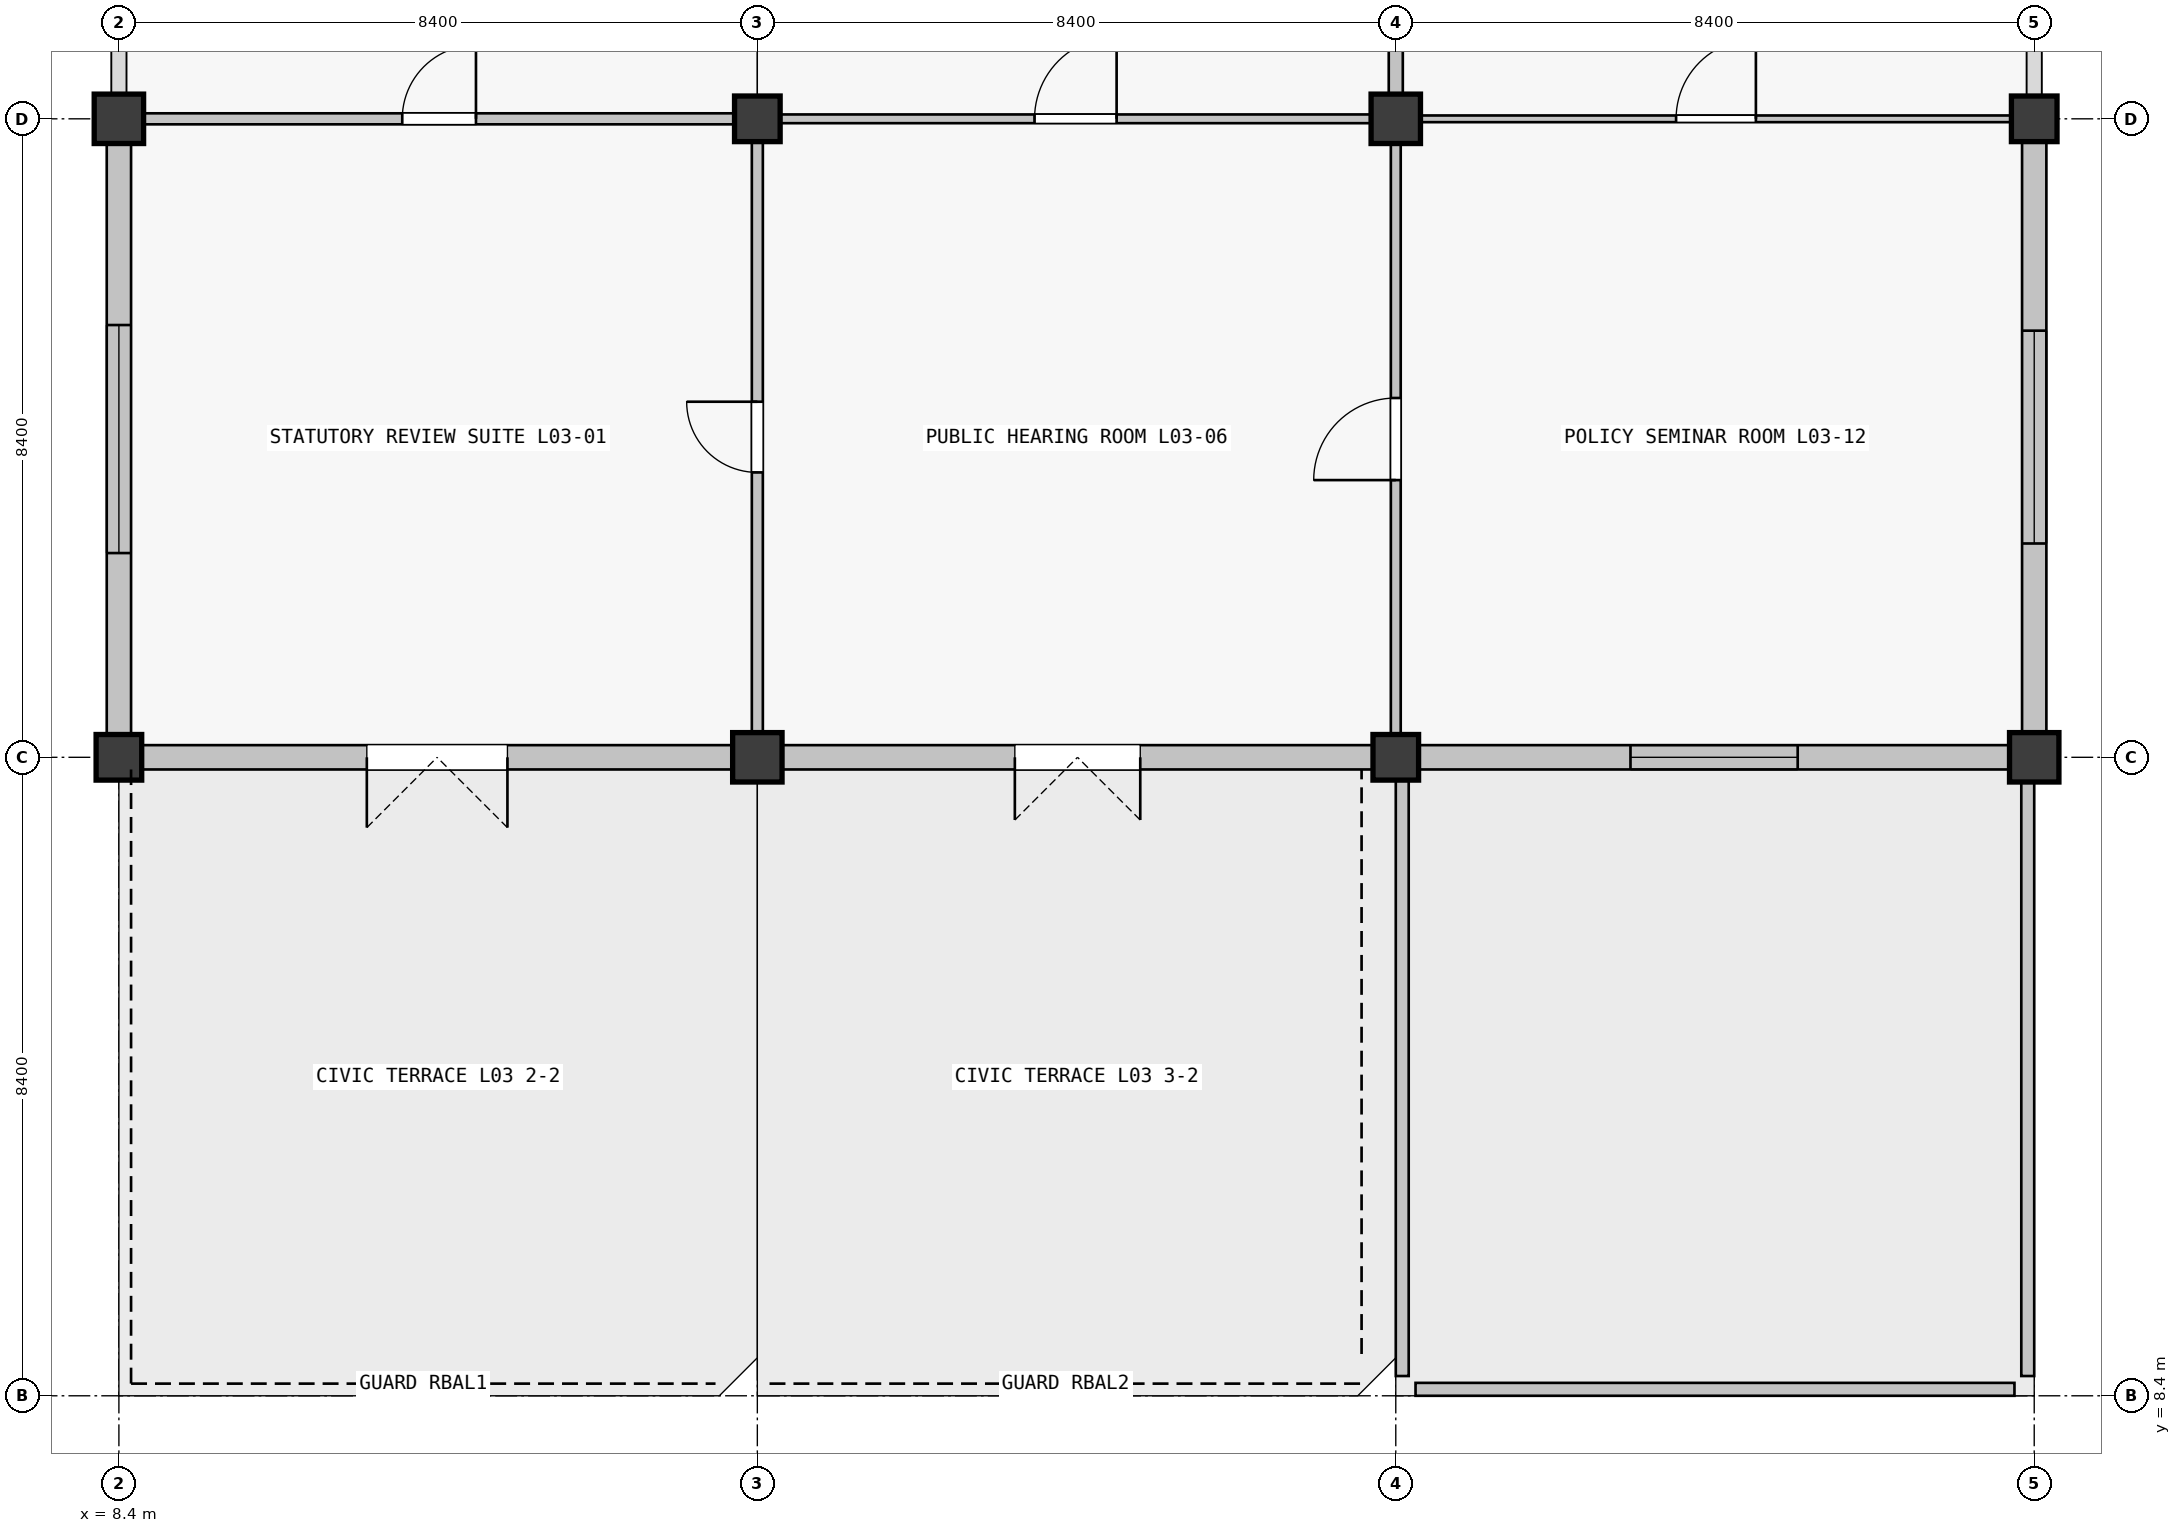
"""IFC4 building model, lengths in metres.
Left out: names, types, materials, properties, quantities, classifications, styles, units other than length and angle.
Written with IfcOpenShell. Run it as: python <this file> out.ifc"""

import sys

from ifc_helpers import new_model, si_unit, direction, frame, frame_2d, origin, origin_2d, place, context, subcontext, project, spatial, rectangle, extrude, element, fill, save


model = new_model("IFC4")
c1 = context("Model", 3, precision=1e-05, world=origin(), true_north=direction((0.0, 1.0)))
c2 = subcontext(c1, "Body", "Model", "MODEL_VIEW")
j1 = project(units=[si_unit("LENGTHUNIT", "METRE"), si_unit("PLANEANGLEUNIT", "RADIAN")], contexts=[c1])
p1 = place(None, origin())
s1 = spatial("IfcSite", under=j1, at=p1, CompositionType="ELEMENT")
p2 = place(p1, origin())
s2 = spatial("IfcBuilding", under=s1, at=p2, CompositionType="ELEMENT")
p3 = place(p2, frame((0.0, 0.0, 14.76)))
s3 = spatial("IfcBuildingStorey", under=s2, at=p3, CompositionType="ELEMENT", Elevation=14.76)
p4 = place(p3, frame((8.4, 16.8, 0.0), z_axis=(0.0, 0.0, 1.0), x_axis=(1.0, 0.0, 0.0)))
e1 = element("IfcColumn", 1, at=p4, inside=s3, PredefinedType="COLUMN", context=c2, shape_type="SweptSolid", body=[
    extrude(rectangle(XDim=0.6, YDim=0.6, at=origin_2d()), origin(), (0.0, 0.0, 1.0), 4.32),
])
for number, where, z_axis, x_axis in (
    (2, (8.4, 25.2, 0.0), (0.0, 0.0, 1.0), (1.0, 0.0, 0.0)),
    (3, (16.8, 16.8, 0.0), (0.0, 0.0, 1.0), (1.0, 0.0, 0.0)),
):
    element("IfcColumn", number, at=place(p3, frame(where, z_axis=z_axis, x_axis=x_axis)), inside=s3, PredefinedType="COLUMN", context=c2, shape_type="SweptSolid", body=[
        extrude(rectangle(XDim=0.65, YDim=0.65, at=origin_2d()), origin(), (0.0, 0.0, 1.0), 4.32),
    ])
for number, where, z_axis, x_axis in (
    (4, (16.8, 25.2, 0.0), (0.0, 0.0, 1.0), (1.0, 0.0, 0.0)),
    (5, (25.2, 16.8, 0.0), (0.0, 0.0, 1.0), (1.0, 0.0, 0.0)),
):
    element("IfcColumn", number, at=place(p3, frame(where, z_axis=z_axis, x_axis=x_axis)), inside=s3, PredefinedType="COLUMN", context=c2, shape_type="SweptSolid", body=[
        extrude(rectangle(XDim=0.6, YDim=0.6, at=origin_2d()), origin(), (0.0, 0.0, 1.0), 4.32),
    ])
for number, where, z_axis, x_axis in (
    (6, (25.2, 25.2, 0.0), (0.0, 0.0, 1.0), (1.0, 0.0, 0.0)),
    (7, (33.6, 16.8, 0.0), (0.0, 0.0, 1.0), (1.0, 0.0, 0.0)),
):
    element("IfcColumn", number, at=place(p3, frame(where, z_axis=z_axis, x_axis=x_axis)), inside=s3, PredefinedType="COLUMN", context=c2, shape_type="SweptSolid", body=[
        extrude(rectangle(XDim=0.65, YDim=0.65, at=origin_2d()), origin(), (0.0, 0.0, 1.0), 4.32),
    ])
p5 = place(p3, frame((33.6, 25.2, 0.0), z_axis=(0.0, 0.0, 1.0), x_axis=(1.0, 0.0, 0.0)))
e8 = element("IfcColumn", 8, at=p5, inside=s3, PredefinedType="COLUMN", context=c2, shape_type="SweptSolid", body=[
    extrude(rectangle(XDim=0.6, YDim=0.6, at=origin_2d()), origin(), (0.0, 0.0, 1.0), 4.32),
])
p6 = place(p3, frame((16.474, 16.8, 0.0), z_axis=(0.0, 0.0, 1.0), x_axis=(-1.0, 0.0, 0.0)))
e9 = element("IfcWall", 9, at=p6, inside=s3, PredefinedType="SOLIDWALL", context=c2, shape_type="SweptSolid", body=[
    extrude(rectangle(XDim=7.773, YDim=0.32, at=frame_2d((3.887, 0.0))), origin(), (0.0, 0.0, 1.0), 3.37),
])
p7 = place(p6, frame((2.962, 0.0, 0.0)))
e10 = element("IfcOpeningElement", 10, at=p7, cuts=e9, PredefinedType="OPENING", context=c2, shape_type="SweptSolid", body=[
    extrude(rectangle(XDim=1.85, YDim=2.2, at=frame_2d((0.925, 1.1))), frame((0.0, 0.16, 0.0), z_axis=(0.0, -1.0, 0.0), x_axis=(1.0, 0.0, 0.0)), (0.0, 0.0, 1.0), 0.32),
])
p8 = place(p3, frame((8.4, 17.101, 0.0), z_axis=(0.0, 0.0, 1.0), x_axis=(0.0, 1.0, 0.0)))
e11 = element("IfcWall", 11, at=p8, inside=s3, PredefinedType="SOLIDWALL", context=c2, shape_type="SweptSolid", body=[
    extrude(rectangle(XDim=7.773, YDim=0.32, at=frame_2d((3.886, 0.0))), origin(), (0.0, 0.0, 1.0), 3.37),
])
p9 = place(p8, frame((2.386, 0.0, 0.9)))
e12 = element("IfcOpeningElement", 12, at=p9, cuts=e11, PredefinedType="OPENING", context=c2, shape_type="SweptSolid", body=[
    extrude(rectangle(XDim=3.0, YDim=1.2, at=frame_2d((1.5, 0.6))), frame((0.0, 0.16, 0.0), z_axis=(0.0, -1.0, 0.0), x_axis=(1.0, 0.0, 0.0)), (0.0, 0.0, 1.0), 0.32),
])
p10 = place(p3, frame((24.899, 16.8, 0.0), z_axis=(0.0, 0.0, 1.0), x_axis=(-1.0, 0.0, 0.0)))
e13 = element("IfcWall", 13, at=p10, inside=s3, PredefinedType="SOLIDWALL", context=c2, shape_type="SweptSolid", body=[
    extrude(rectangle(XDim=7.773, YDim=0.32, at=frame_2d((3.886, 0.0))), origin(), (0.0, 0.0, 1.0), 3.37),
])
p11 = place(p10, frame((3.061, 0.0, 0.0)))
e14 = element("IfcOpeningElement", 14, at=p11, cuts=e13, PredefinedType="OPENING", context=c2, shape_type="SweptSolid", body=[
    extrude(rectangle(XDim=1.65, YDim=2.2, at=frame_2d((0.825, 1.1))), frame((0.0, 0.16, 0.0), z_axis=(0.0, -1.0, 0.0), x_axis=(1.0, 0.0, 0.0)), (0.0, 0.0, 1.0), 0.32),
])
p12 = place(p3, frame((33.274, 16.8, 0.0), z_axis=(0.0, 0.0, 1.0), x_axis=(-1.0, 0.0, 0.0)))
e15 = element("IfcWall", 15, at=p12, inside=s3, PredefinedType="SOLIDWALL", context=c2, shape_type="SweptSolid", body=[
    extrude(rectangle(XDim=7.773, YDim=0.32, at=frame_2d((3.886, 0.0))), origin(), (0.0, 0.0, 1.0), 3.37),
])
p13 = place(p12, frame((2.786, 0.0, 0.9)))
e16 = element("IfcOpeningElement", 16, at=p13, cuts=e15, PredefinedType="OPENING", context=c2, shape_type="SweptSolid", body=[
    extrude(rectangle(XDim=2.2, YDim=1.75, at=frame_2d((1.1, 0.875))), frame((0.0, 0.16, 0.0), z_axis=(0.0, -1.0, 0.0), x_axis=(1.0, 0.0, 0.0)), (0.0, 0.0, 1.0), 0.32),
])
p14 = place(p3, frame((33.6, 24.899, 0.0), z_axis=(0.0, 0.0, 1.0), x_axis=(0.0, -1.0, 0.0)))
e17 = element("IfcWall", 17, at=p14, inside=s3, PredefinedType="SOLIDWALL", context=c2, shape_type="SweptSolid", body=[
    extrude(rectangle(XDim=7.773, YDim=0.32, at=frame_2d((3.886, 0.0))), origin(), (0.0, 0.0, 1.0), 3.37),
])
p15 = place(p14, frame((2.486, 0.0, 0.9)))
e18 = element("IfcOpeningElement", 18, at=p15, cuts=e17, PredefinedType="OPENING", context=c2, shape_type="SweptSolid", body=[
    extrude(rectangle(XDim=2.8, YDim=1.75, at=frame_2d((1.4, 0.875))), frame((0.0, 0.16, 0.0), z_axis=(0.0, -1.0, 0.0), x_axis=(1.0, 0.0, 0.0)), (0.0, 0.0, 1.0), 0.32),
])
for number, where, z_axis, x_axis in (
    (19, (33.34, 8.485, 0.0), (0.0, 0.0, 1.0), (-1.0, 0.0, 0.0)),
    (20, (25.285, 8.66, 0.0), (0.0, 0.0, 1.0), (0.0, 1.0, 0.0)),
    (21, (33.515, 16.54, 0.0), (0.0, 0.0, 1.0), (0.0, -1.0, 0.0)),
):
    element("IfcWall", number, at=place(p3, frame(where, z_axis=z_axis, x_axis=x_axis)), inside=s3, PredefinedType="PARAPET", context=c2, shape_type="SweptSolid", body=[
        extrude(rectangle(XDim=7.88, YDim=0.17, at=frame_2d((3.94, 0.0))), origin(), (0.0, 0.0, 1.0), 0.95),
    ])
p16 = place(p3, frame((8.727, 25.2, 0.0), z_axis=(0.0, 0.0, 1.0), x_axis=(1.0, 0.0, 0.0)))
e22 = element("IfcWall", 22, at=p16, inside=s3, PredefinedType="PARTITIONING", context=c2, shape_type="SweptSolid", body=[
    extrude(rectangle(XDim=7.771, YDim=0.145, at=frame_2d((3.885, 0.0))), origin(), (0.0, 0.0, 1.0), 3.19),
])
p17 = place(p16, frame((3.401, 0.0, 0.0)))
e23 = element("IfcOpeningElement", 23, at=p17, cuts=e22, PredefinedType="OPENING", context=c2, shape_type="SweptSolid", body=[
    extrude(rectangle(XDim=0.97, YDim=2.12, at=frame_2d((0.485, 1.06))), frame((0.0, 0.073, 0.0), z_axis=(0.0, -1.0, 0.0), x_axis=(1.0, 0.0, 0.0)), (0.0, 0.0, 1.0), 0.145),
])
p18 = place(p3, frame((17.102, 25.2, 0.0), z_axis=(0.0, 0.0, 1.0), x_axis=(1.0, 0.0, 0.0)))
e24 = element("IfcWall", 24, at=p18, inside=s3, PredefinedType="PARTITIONING", context=c2, shape_type="SweptSolid", body=[
    extrude(rectangle(XDim=7.771, YDim=0.115, at=frame_2d((3.885, 0.0))), origin(), (0.0, 0.0, 1.0), 3.19),
])
p19 = place(p18, frame((3.345, 0.0, 0.0)))
e25 = element("IfcOpeningElement", 25, at=p19, cuts=e24, PredefinedType="OPENING", context=c2, shape_type="SweptSolid", body=[
    extrude(rectangle(XDim=1.08, YDim=2.25, at=frame_2d((0.54, 1.125))), frame((0.0, 0.058, 0.0), z_axis=(0.0, -1.0, 0.0), x_axis=(1.0, 0.0, 0.0)), (0.0, 0.0, 1.0), 0.115),
])
p20 = place(p3, frame((25.527, 25.2, 0.0), z_axis=(0.0, 0.0, 1.0), x_axis=(1.0, 0.0, 0.0)))
e26 = element("IfcWall", 26, at=p20, inside=s3, PredefinedType="PARTITIONING", context=c2, shape_type="SweptSolid", body=[
    extrude(rectangle(XDim=7.771, YDim=0.088, at=frame_2d((3.885, 0.0))), origin(), (0.0, 0.0, 1.0), 3.19),
])
p21 = place(p20, frame((3.361, 0.0, 0.0)))
e27 = element("IfcOpeningElement", 27, at=p21, cuts=e26, PredefinedType="OPENING", context=c2, shape_type="SweptSolid", body=[
    extrude(rectangle(XDim=1.05, YDim=2.12, at=frame_2d((0.525, 1.06))), frame((0.0, 0.044, 0.0), z_axis=(0.0, -1.0, 0.0), x_axis=(1.0, 0.0, 0.0)), (0.0, 0.0, 1.0), 0.088),
])
p22 = place(p3, frame((16.8, 17.127, 0.0), z_axis=(0.0, 0.0, 1.0), x_axis=(0.0, 1.0, 0.0)))
e28 = element("IfcWall", 28, at=p22, inside=s3, PredefinedType="PARTITIONING", context=c2, shape_type="SweptSolid", body=[
    extrude(rectangle(XDim=7.771, YDim=0.145, at=frame_2d((3.885, 0.0))), origin(), (0.0, 0.0, 1.0), 3.19),
])
p23 = place(p22, frame((3.421, 0.0, 0.0)))
e29 = element("IfcOpeningElement", 29, at=p23, cuts=e28, PredefinedType="OPENING", context=c2, shape_type="SweptSolid", body=[
    extrude(rectangle(XDim=0.93, YDim=2.12, at=frame_2d((0.465, 1.06))), frame((0.0, 0.073, 0.0), z_axis=(0.0, -1.0, 0.0), x_axis=(1.0, 0.0, 0.0)), (0.0, 0.0, 1.0), 0.145),
])
p24 = place(p3, frame((25.2, 17.102, 0.0), z_axis=(0.0, 0.0, 1.0), x_axis=(0.0, 1.0, 0.0)))
e30 = element("IfcWall", 30, at=p24, inside=s3, PredefinedType="MOVABLE", context=c2, shape_type="SweptSolid", body=[
    extrude(rectangle(XDim=7.771, YDim=0.13, at=frame_2d((3.885, 0.0))), origin(), (0.0, 0.0, 1.0), 3.19),
])
p25 = place(p24, frame((3.345, 0.0, 0.0)))
e31 = element("IfcOpeningElement", 31, at=p25, cuts=e30, PredefinedType="OPENING", context=c2, shape_type="SweptSolid", body=[
    extrude(rectangle(XDim=1.08, YDim=2.25, at=frame_2d((0.54, 1.125))), frame((0.0, 0.065, 0.0), z_axis=(0.0, -1.0, 0.0), x_axis=(1.0, 0.0, 0.0)), (0.0, 0.0, 1.0), 0.13),
])
p26 = place(p3, frame((25.2, 25.527, 0.0), z_axis=(0.0, 0.0, 1.0), x_axis=(0.0, 1.0, 0.0)))
e32 = element("IfcWall", 32, at=p26, inside=s3, PredefinedType="PARTITIONING", context=c2, shape_type="SweptSolid", body=[
    extrude(rectangle(XDim=7.771, YDim=0.185, at=frame_2d((3.885, 0.0))), origin(), (0.0, 0.0, 1.0), 3.19),
])
p27 = place(p26, frame((3.365, 0.0, 0.0)))
e33 = element("IfcOpeningElement", 33, at=p27, cuts=e32, PredefinedType="OPENING", context=c2, shape_type="SweptSolid", body=[
    extrude(rectangle(XDim=1.04, YDim=2.2, at=frame_2d((0.52, 1.1))), frame((0.0, 0.093, 0.0), z_axis=(0.0, -1.0, 0.0), x_axis=(1.0, 0.0, 0.0)), (0.0, 0.0, 1.0), 0.185),
])
p28 = place(p7, origin())
e34 = element("IfcDoor", 34, at=p28, inside=s3, OperationType="DOUBLE_DOOR_SINGLE_SWING", PredefinedType="DOOR", context=c2, shape_type="SweptSolid", body=[
    extrude(rectangle(XDim=1.85, YDim=2.2, at=frame_2d((0.925, 1.1))), frame((0.0, 0.025, 0.0), z_axis=(0.0, -1.0, 0.0), x_axis=(1.0, 0.0, 0.0)), (0.0, 0.0, 1.0), 0.05),
])
fill(e10, e34)
p29 = place(p9, origin())
e35 = element("IfcWindow", 35, at=p29, inside=s3, PartitioningType="SINGLE_PANEL", PredefinedType="WINDOW", context=c2, shape_type="SweptSolid", body=[
    extrude(rectangle(XDim=3.0, YDim=1.2, at=frame_2d((1.5, 0.6))), frame((0.0, 0.03, 0.0), z_axis=(0.0, -1.0, 0.0), x_axis=(1.0, 0.0, 0.0)), (0.0, 0.0, 1.0), 0.06),
])
fill(e12, e35)
p30 = place(p11, origin())
e36 = element("IfcDoor", 36, at=p30, inside=s3, OperationType="DOUBLE_DOOR_SINGLE_SWING", PredefinedType="DOOR", context=c2, shape_type="SweptSolid", body=[
    extrude(rectangle(XDim=1.65, YDim=2.2, at=frame_2d((0.825, 1.1))), frame((0.0, 0.025, 0.0), z_axis=(0.0, -1.0, 0.0), x_axis=(1.0, 0.0, 0.0)), (0.0, 0.0, 1.0), 0.05),
])
fill(e14, e36)
p31 = place(p13, origin())
e37 = element("IfcWindow", 37, at=p31, inside=s3, PartitioningType="SINGLE_PANEL", PredefinedType="WINDOW", context=c2, shape_type="SweptSolid", body=[
    extrude(rectangle(XDim=2.2, YDim=1.75, at=frame_2d((1.1, 0.875))), frame((0.0, 0.03, 0.0), z_axis=(0.0, -1.0, 0.0), x_axis=(1.0, 0.0, 0.0)), (0.0, 0.0, 1.0), 0.06),
])
fill(e16, e37)
p32 = place(p15, origin())
e38 = element("IfcWindow", 38, at=p32, inside=s3, PartitioningType="SINGLE_PANEL", PredefinedType="WINDOW", context=c2, shape_type="SweptSolid", body=[
    extrude(rectangle(XDim=2.8, YDim=1.75, at=frame_2d((1.4, 0.875))), frame((0.0, 0.03, 0.0), z_axis=(0.0, -1.0, 0.0), x_axis=(1.0, 0.0, 0.0)), (0.0, 0.0, 1.0), 0.06),
])
fill(e18, e38)
p33 = place(p17, origin())
e39 = element("IfcDoor", 39, at=p33, inside=s3, OperationType="SINGLE_SWING_RIGHT", PredefinedType="DOOR", context=c2, shape_type="SweptSolid", body=[
    extrude(rectangle(XDim=0.97, YDim=2.12, at=frame_2d((0.485, 1.06))), frame((0.0, 0.025, 0.0), z_axis=(0.0, -1.0, 0.0), x_axis=(1.0, 0.0, 0.0)), (0.0, 0.0, 1.0), 0.05),
])
fill(e23, e39)
p34 = place(p19, origin())
e40 = element("IfcDoor", 40, at=p34, inside=s3, OperationType="SINGLE_SWING_RIGHT", PredefinedType="DOOR", context=c2, shape_type="SweptSolid", body=[
    extrude(rectangle(XDim=1.08, YDim=2.25, at=frame_2d((0.54, 1.125))), frame((0.0, 0.025, 0.0), z_axis=(0.0, -1.0, 0.0), x_axis=(1.0, 0.0, 0.0)), (0.0, 0.0, 1.0), 0.05),
])
fill(e25, e40)
p35 = place(p21, origin())
e41 = element("IfcDoor", 41, at=p35, inside=s3, OperationType="SINGLE_SWING_RIGHT", PredefinedType="DOOR", context=c2, shape_type="SweptSolid", body=[
    extrude(rectangle(XDim=1.05, YDim=2.12, at=frame_2d((0.525, 1.06))), frame((0.0, 0.025, 0.0), z_axis=(0.0, -1.0, 0.0), x_axis=(1.0, 0.0, 0.0)), (0.0, 0.0, 1.0), 0.05),
])
fill(e27, e41)
p36 = place(p23, origin())
e42 = element("IfcDoor", 42, at=p36, inside=s3, OperationType="SINGLE_SWING_RIGHT", PredefinedType="DOOR", context=c2, shape_type="SweptSolid", body=[
    extrude(rectangle(XDim=0.93, YDim=2.12, at=frame_2d((0.465, 1.06))), frame((0.0, 0.025, 0.0), z_axis=(0.0, -1.0, 0.0), x_axis=(1.0, 0.0, 0.0)), (0.0, 0.0, 1.0), 0.05),
])
fill(e29, e42)
p37 = place(p25, origin())
e43 = element("IfcDoor", 43, at=p37, inside=s3, OperationType="SINGLE_SWING_LEFT", PredefinedType="DOOR", context=c2, shape_type="SweptSolid", body=[
    extrude(rectangle(XDim=1.08, YDim=2.25, at=frame_2d((0.54, 1.125))), frame((0.0, 0.025, 0.0), z_axis=(0.0, -1.0, 0.0), x_axis=(1.0, 0.0, 0.0)), (0.0, 0.0, 1.0), 0.05),
])
fill(e31, e43)
save(model, sys.argv[1])
